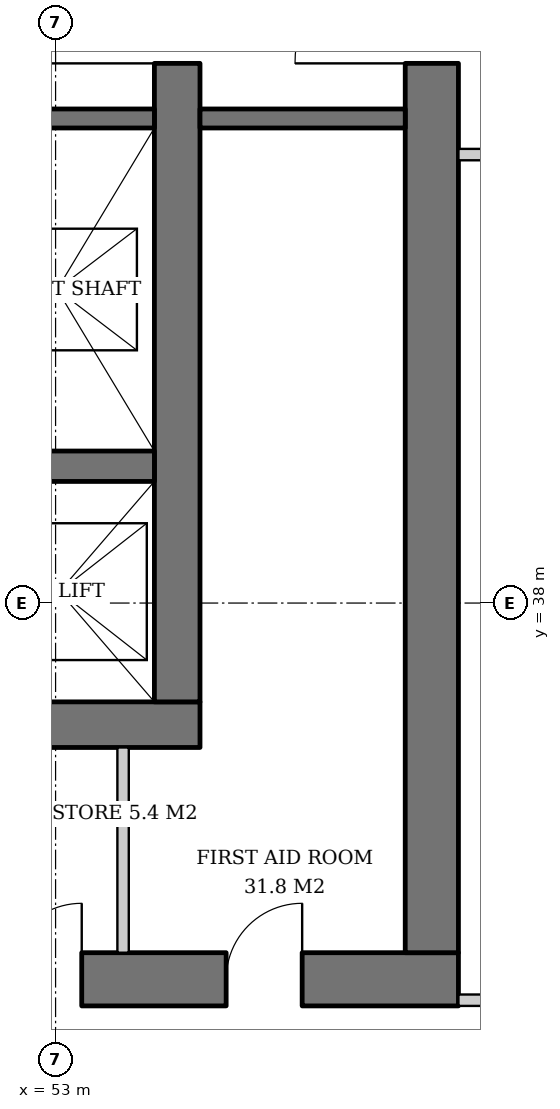
"""IFC4 building model, lengths in metres.
Left out: names, types, materials, properties, quantities, classifications, styles, units other than length and angle.
Written with IfcOpenShell. Run it as: python <this file> out.ifc"""

import sys

from ifc_helpers import new_model, si_unit, direction, frame, frame_2d, origin, place, context, subcontext, project, spatial, rectangle, extrude, element, fill, save


model = new_model("IFC4")
c1 = context("Model", 3, precision=1e-05, world=origin(), true_north=direction((0.0, 1.0)))
c2 = subcontext(c1, "Body", "Model", "MODEL_VIEW")
j1 = project(units=[si_unit("LENGTHUNIT", "METRE"), si_unit("PLANEANGLEUNIT", "RADIAN")], contexts=[c1])
p1 = place(None, origin())
s1 = spatial("IfcSite", under=j1, at=p1, CompositionType="ELEMENT")
p2 = place(p1, origin())
s2 = spatial("IfcBuilding", under=s1, at=p2, CompositionType="ELEMENT")
p3 = place(p2, frame((0.0, 0.0, 119.8)))
s3 = spatial("IfcBuildingStorey", under=s2, at=p3, CompositionType="ELEMENT", Elevation=119.8)
p4 = place(p3, frame((35.1, 36.4, 0.0), z_axis=(0.0, 0.0, 1.0), x_axis=(1.0, 0.0, 0.0)))
e1 = element("IfcWall", 1, at=p4, inside=s3, PredefinedType="SHEAR", context=c2, shape_type="SweptSolid", body=[
    extrude(rectangle(XDim=19.8, YDim=0.6, at=frame_2d((9.9, 0.0))), origin(), (0.0, 0.0, 1.0), 3.8),
])
p5 = place(p4, frame((3.9, 0.0, 0.0)))
e2 = element("IfcOpeningElement", 2, at=p5, cuts=e1, PredefinedType="OPENING", context=c2, shape_type="SweptSolid", body=[
    extrude(rectangle(XDim=1.0, YDim=2.1, at=frame_2d((0.5, 1.05))), frame((0.0, 0.31, 0.0), z_axis=(0.0, -1.0, 0.0), x_axis=(1.0, 0.0, 0.0)), (0.0, 0.0, 1.0), 0.62),
])
p6 = place(p4, frame((15.35, 0.0, 0.0)))
e3 = element("IfcOpeningElement", 3, at=p6, cuts=e1, PredefinedType="OPENING", context=c2, shape_type="SweptSolid", body=[
    extrude(rectangle(XDim=1.0, YDim=2.1, at=frame_2d((0.5, 1.05))), frame((0.0, 0.31, 0.0), z_axis=(0.0, -1.0, 0.0), x_axis=(1.0, 0.0, 0.0)), (0.0, 0.0, 1.0), 0.62),
])
p7 = place(p3, frame((54.6, 36.7, 0.0), z_axis=(0.0, 0.0, 1.0), x_axis=(0.0, 1.0, 0.0)))
e4 = element("IfcWall", 4, at=p7, inside=s3, PredefinedType="SHEAR", context=c2, shape_type="SweptSolid", body=[
    extrude(rectangle(XDim=18.6, YDim=0.6, at=frame_2d((9.3, 0.0))), origin(), (0.0, 0.0, 1.0), 3.8),
])
p8 = place(p7, frame((8.4, 0.0, 0.0)))
e5 = element("IfcOpeningElement", 5, at=p8, cuts=e4, PredefinedType="OPENING", context=c2, shape_type="SweptSolid", body=[
    extrude(rectangle(XDim=1.8, YDim=2.4, at=frame_2d((0.9, 1.2))), frame((0.0, 0.31, 0.0), z_axis=(0.0, -1.0, 0.0), x_axis=(1.0, 0.0, 0.0)), (0.0, 0.0, 1.0), 0.62),
])
p9 = place(p3, frame((31.7, 33.05, 0.0), z_axis=(0.0, 0.0, 1.0), x_axis=(1.0, 0.0, 0.0)))
e6 = element("IfcWall", 6, at=p9, inside=s3, PredefinedType="SHEAR", context=c2, shape_type="SweptSolid", body=[
    extrude(rectangle(XDim=26.6, YDim=0.7, at=frame_2d((13.3, 0.0))), origin(), (0.0, 0.0, 1.0), 3.8),
])
p10 = place(p9, frame((7.3, 0.0, 0.0)))
e7 = element("IfcOpeningElement", 7, at=p10, cuts=e6, PredefinedType="OPENING", context=c2, shape_type="SweptSolid", body=[
    extrude(rectangle(XDim=1.0, YDim=2.1, at=frame_2d((0.5, 1.05))), frame((0.0, 0.36, 0.0), z_axis=(0.0, -1.0, 0.0), x_axis=(1.0, 0.0, 0.0)), (0.0, 0.0, 1.0), 0.72),
])
p11 = place(p9, frame((18.75, 0.0, 0.0)))
e8 = element("IfcOpeningElement", 8, at=p11, cuts=e6, PredefinedType="OPENING", context=c2, shape_type="SweptSolid", body=[
    extrude(rectangle(XDim=1.0, YDim=2.1, at=frame_2d((0.5, 1.05))), frame((0.0, 0.36, 0.0), z_axis=(0.0, -1.0, 0.0), x_axis=(1.0, 0.0, 0.0)), (0.0, 0.0, 1.0), 0.72),
])
p12 = place(p9, frame((1.85, 0.0, 0.0)))
e9 = element("IfcOpeningElement", 9, at=p12, cuts=e6, PredefinedType="OPENING", context=c2, shape_type="SweptSolid", body=[
    extrude(rectangle(XDim=1.0, YDim=2.1, at=frame_2d((0.5, 1.05))), frame((0.0, 0.36, 0.0), z_axis=(0.0, -1.0, 0.0), x_axis=(1.0, 0.0, 0.0)), (0.0, 0.0, 1.0), 0.72),
])
p13 = place(p9, frame((4.7, 0.0, 0.0)))
e10 = element("IfcOpeningElement", 10, at=p13, cuts=e6, PredefinedType="OPENING", context=c2, shape_type="SweptSolid", body=[
    extrude(rectangle(XDim=1.0, YDim=2.1, at=frame_2d((0.5, 1.05))), frame((0.0, 0.36, 0.0), z_axis=(0.0, -1.0, 0.0), x_axis=(1.0, 0.0, 0.0)), (0.0, 0.0, 1.0), 0.72),
])
p14 = place(p9, frame((12.44, 0.0, 0.0)))
e11 = element("IfcOpeningElement", 11, at=p14, cuts=e6, PredefinedType="OPENING", context=c2, shape_type="SweptSolid", body=[
    extrude(rectangle(XDim=1.0, YDim=2.1, at=frame_2d((0.5, 1.05))), frame((0.0, 0.36, 0.0), z_axis=(0.0, -1.0, 0.0), x_axis=(1.0, 0.0, 0.0)), (0.0, 0.0, 1.0), 0.72),
])
p15 = place(p9, frame((20.644, 0.0, 0.0)))
e12 = element("IfcOpeningElement", 12, at=p15, cuts=e6, PredefinedType="OPENING", context=c2, shape_type="SweptSolid", body=[
    extrude(rectangle(XDim=1.0, YDim=2.1, at=frame_2d((0.5, 1.05))), frame((0.0, 0.36, 0.0), z_axis=(0.0, -1.0, 0.0), x_axis=(1.0, 0.0, 0.0)), (0.0, 0.0, 1.0), 0.72),
])
p16 = place(p9, frame((23.544, 0.0, 0.0)))
e13 = element("IfcOpeningElement", 13, at=p16, cuts=e6, PredefinedType="OPENING", context=c2, shape_type="SweptSolid", body=[
    extrude(rectangle(XDim=1.0, YDim=2.1, at=frame_2d((0.5, 1.05))), frame((0.0, 0.36, 0.0), z_axis=(0.0, -1.0, 0.0), x_axis=(1.0, 0.0, 0.0)), (0.0, 0.0, 1.0), 0.72),
])
p17 = place(p3, frame((57.95, 33.4, 0.0), z_axis=(0.0, 0.0, 1.0), x_axis=(0.0, 1.0, 0.0)))
e14 = element("IfcWall", 14, at=p17, inside=s3, PredefinedType="SHEAR", context=c2, shape_type="SweptSolid", body=[
    extrude(rectangle(XDim=25.2, YDim=0.7, at=frame_2d((12.6, 0.0))), origin(), (0.0, 0.0, 1.0), 3.8),
])
p18 = place(p17, frame((11.7, 0.0, 0.0)))
e15 = element("IfcOpeningElement", 15, at=p18, cuts=e14, PredefinedType="OPENING", context=c2, shape_type="SweptSolid", body=[
    extrude(rectangle(XDim=1.8, YDim=2.4, at=frame_2d((0.9, 1.2))), frame((0.0, 0.36, 0.0), z_axis=(0.0, -1.0, 0.0), x_axis=(1.0, 0.0, 0.0)), (0.0, 0.0, 1.0), 0.72),
])
p19 = place(p3, frame((35.7, 39.8, 0.0), z_axis=(0.0, 0.0, 1.0), x_axis=(1.0, 0.0, 0.0)))
e16 = element("IfcWall", 16, at=p19, inside=s3, PredefinedType="SHEAR", context=c2, shape_type="SweptSolid", body=[
    extrude(rectangle(XDim=18.6, YDim=0.4, at=frame_2d((9.3, 0.0))), origin(), (0.0, 0.0, 1.0), 3.8),
])
p20 = place(p3, frame((48.93, 44.375, 0.0), z_axis=(0.0, 0.0, 1.0), x_axis=(1.0, 0.0, 0.0)))
e17 = element("IfcWall", 17, at=p20, inside=s3, PredefinedType="SHEAR", context=c2, shape_type="SweptSolid", body=[
    extrude(rectangle(XDim=5.37, YDim=0.25, at=frame_2d((2.685, 0.0))), origin(), (0.0, 0.0, 1.0), 3.8),
])
p21 = place(p3, frame((54.9, 44.375, 0.0), z_axis=(0.0, 0.0, 1.0), x_axis=(1.0, 0.0, 0.0)))
e18 = element("IfcWall", 18, at=p21, inside=s3, PredefinedType="SOLIDWALL", context=c2, shape_type="SweptSolid", body=[
    extrude(rectangle(XDim=2.7, YDim=0.25, at=frame_2d((1.35, 0.0))), origin(), (0.0, 0.0, 1.0), 3.62),
])
p22 = place(p3, frame((53.888, 33.4, 0.0), z_axis=(0.0, 0.0, 1.0), x_axis=(0.0, 1.0, 0.0)))
e19 = element("IfcWall", 19, at=p22, inside=s3, PredefinedType="SOLIDWALL", context=c2, shape_type="SweptSolid", body=[
    extrude(rectangle(XDim=2.7, YDim=0.15, at=frame_2d((1.35, 0.0))), origin(), (0.0, 0.0, 1.0), 3.62),
])
for number, where, z_axis, x_axis in (
    (20, (58.3, 32.775, 0.0), (0.0, 0.0, 1.0), (1.0, 0.0, 0.0)),
    (21, (58.3, 43.9, 0.0), (0.0, 0.0, 1.0), (1.0, 0.0, 0.0)),
):
    element("IfcWall", number, at=place(p3, frame(where, z_axis=z_axis, x_axis=x_axis)), inside=s3, PredefinedType="PARTITIONING", context=c2, shape_type="SweptSolid", body=[
        extrude(rectangle(XDim=2.325, YDim=0.15, at=frame_2d((1.163, 0.0))), origin(), (0.0, 0.0, 1.0), 3.62),
    ])
p23 = place(p8, origin())
e22 = element("IfcDoor", 22, at=p23, inside=s3, OperationType="DOUBLE_DOOR_SINGLE_SWING", PredefinedType="DOOR", context=c2, shape_type="SweptSolid", body=[
    extrude(rectangle(XDim=1.8, YDim=2.4, at=frame_2d((0.9, 1.2))), frame((0.0, 0.025, 0.0), z_axis=(0.0, -1.0, 0.0), x_axis=(1.0, 0.0, 0.0)), (0.0, 0.0, 1.0), 0.05),
])
fill(e5, e22)
p24 = place(p18, origin())
e23 = element("IfcDoor", 23, at=p24, inside=s3, OperationType="DOUBLE_DOOR_SINGLE_SWING", PredefinedType="DOOR", context=c2, shape_type="SweptSolid", body=[
    extrude(rectangle(XDim=1.8, YDim=2.4, at=frame_2d((0.9, 1.2))), frame((0.0, 0.025, 0.0), z_axis=(0.0, -1.0, 0.0), x_axis=(1.0, 0.0, 0.0)), (0.0, 0.0, 1.0), 0.05),
])
fill(e15, e23)
p25 = place(p15, origin())
e24 = element("IfcDoor", 24, at=p25, inside=s3, OperationType="SINGLE_SWING_RIGHT", PredefinedType="DOOR", context=c2, shape_type="SweptSolid", body=[
    extrude(rectangle(XDim=1.0, YDim=2.1, at=frame_2d((0.5, 1.05))), frame((0.0, 0.34, 0.0), z_axis=(0.0, -1.0, 0.0), x_axis=(1.0, 0.0, 0.0)), (0.0, 0.0, 1.0), 0.05),
])
fill(e12, e24)
p26 = place(p16, origin())
e25 = element("IfcDoor", 25, at=p26, inside=s3, OperationType="SINGLE_SWING_RIGHT", PredefinedType="DOOR", context=c2, shape_type="SweptSolid", body=[
    extrude(rectangle(XDim=1.0, YDim=2.1, at=frame_2d((0.5, 1.05))), frame((0.0, 0.34, 0.0), z_axis=(0.0, -1.0, 0.0), x_axis=(1.0, 0.0, 0.0)), (0.0, 0.0, 1.0), 0.05),
])
fill(e13, e25)
save(model, sys.argv[1])
